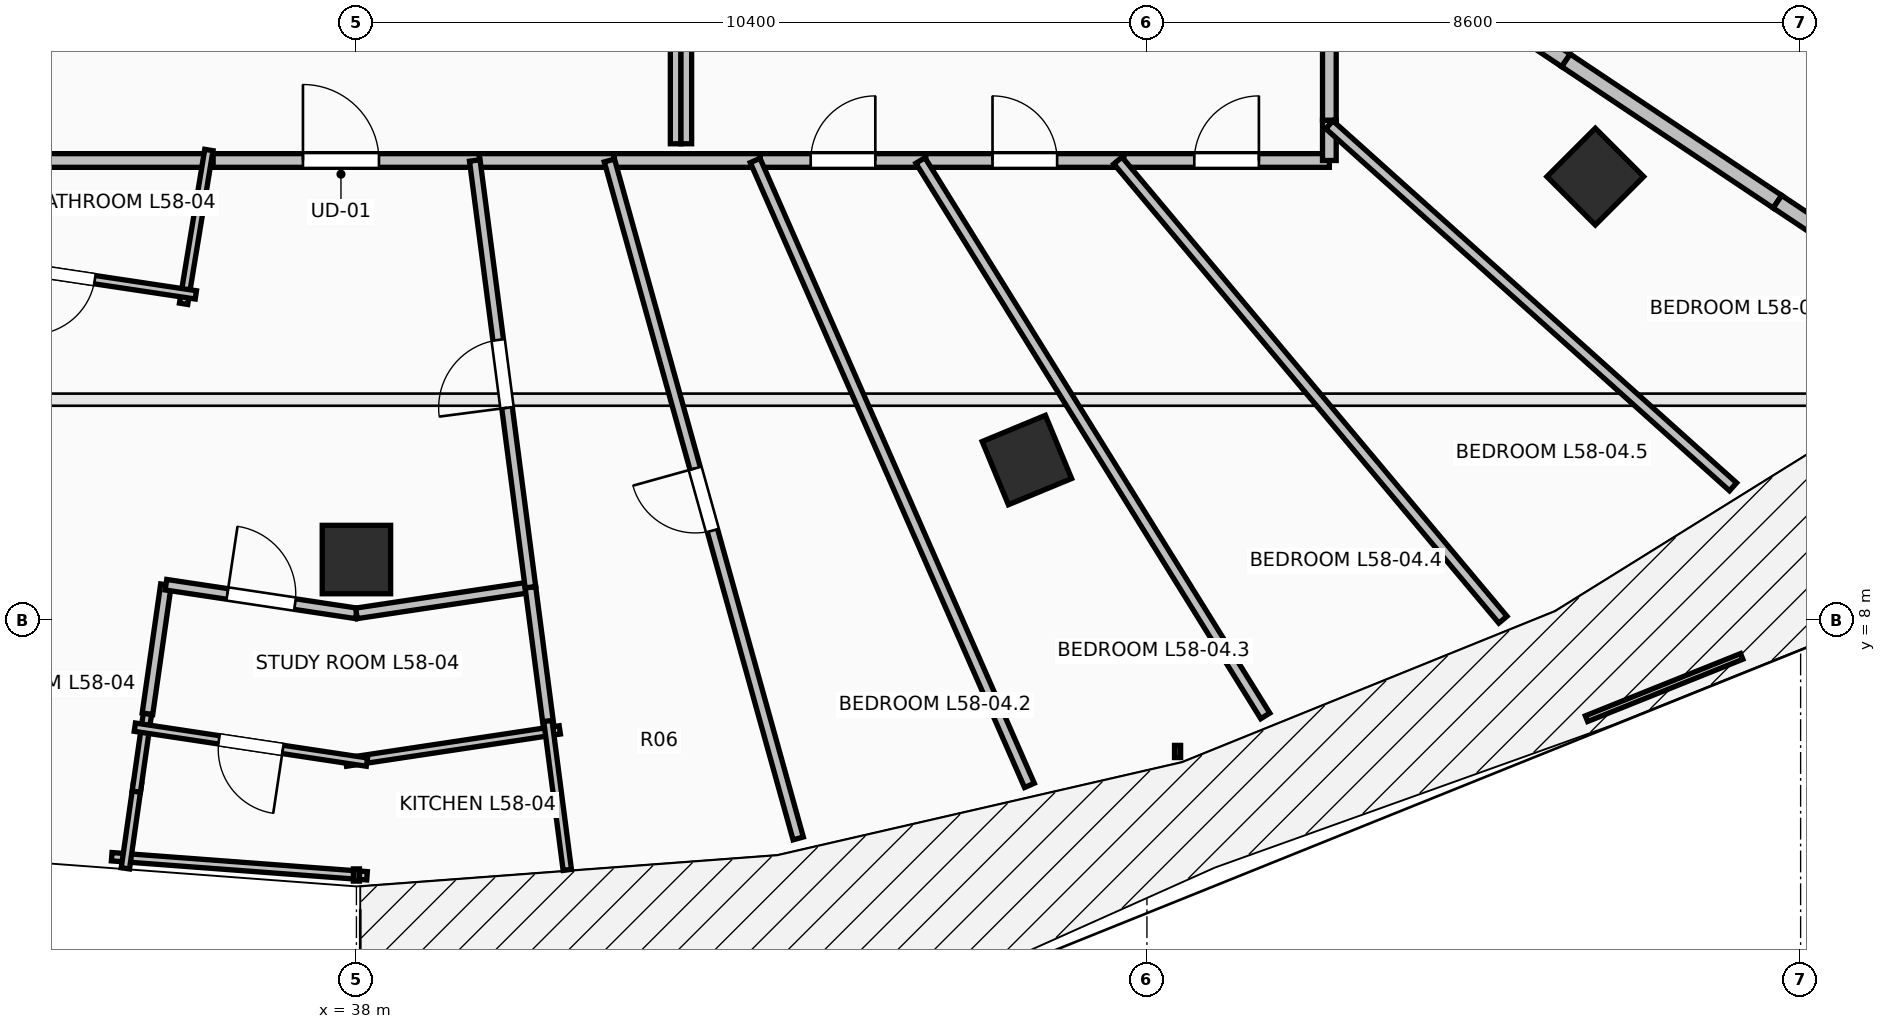
"""IFC4 building model, lengths in metres.
Left out: names, types, materials, properties, quantities, classifications, styles, units other than length and angle.
Written with IfcOpenShell. Run it as: python <this file> out.ifc"""

import sys

from ifc_helpers import new_model, si_unit, direction, frame, frame_2d, origin, origin_2d, place, context, subcontext, project, spatial, rectangle, extrude, element, fill, save


model = new_model("IFC4")
c1 = context("Model", 3, precision=1e-05, world=origin(), true_north=direction((0.0, 1.0)))
c2 = subcontext(c1, "Body", "Model", "MODEL_VIEW")
j1 = project(units=[si_unit("LENGTHUNIT", "METRE"), si_unit("PLANEANGLEUNIT", "RADIAN")], contexts=[c1])
p1 = place(None, origin())
s1 = spatial("IfcSite", under=j1, at=p1, CompositionType="ELEMENT")
p2 = place(p1, origin())
s2 = spatial("IfcBuilding", under=s1, at=p2, CompositionType="ELEMENT")
p3 = place(p2, frame((0.0, 0.0, 214.3)))
s3 = spatial("IfcBuildingStorey", under=s2, at=p3, CompositionType="ELEMENT", Elevation=214.3)
for number, where, z_axis, x_axis in (
    (1, (38.0, 8.8, 0.0), (0.0, 0.0, 1.0), (0.0, -1.0, 0.0)),
    (2, (46.821, 10.109, 0.0), (0.0, 0.0, 1.0), (0.383, -0.924, 0.0)),
    (3, (54.299, 13.838, 0.0), (0.0, 0.0, 1.0), (0.707, -0.707, 0.0)),
):
    element("IfcColumn", number, at=place(p3, frame(where, z_axis=z_axis, x_axis=x_axis)), inside=s3, PredefinedType="COLUMN", context=c2, shape_type="SweptSolid", body=[
        extrude(rectangle(XDim=0.9, YDim=0.9, at=origin_2d()), origin(), (0.0, 0.0, 1.0), 3.55),
    ])
p4 = place(p3, frame((35.975, 14.05, 0.0), z_axis=(0.0, 0.0, 1.0), x_axis=(1.0, 0.0, 0.0)))
e4 = element("IfcWall", 4, at=p4, inside=s3, PredefinedType="PARTITIONING", context=c2, shape_type="SweptSolid", body=[
    extrude(rectangle(XDim=3.643, YDim=0.18, at=frame_2d((1.821, 0.0))), origin(), (0.0, 0.0, 1.0), 2.979),
])
p5 = place(p4, frame((1.322, 0.0, 0.0)))
e5 = element("IfcOpeningElement", 5, at=p5, cuts=e4, PredefinedType="OPENING", context=c2, shape_type="SweptSolid", body=[
    extrude(rectangle(XDim=1.0, YDim=2.15, at=frame_2d((0.5, 1.075))), frame((0.0, 0.105, 0.0), z_axis=(0.0, -1.0, 0.0), x_axis=(1.0, 0.0, 0.0)), (0.0, 0.0, 1.0), 0.21),
])
p6 = place(p3, frame((32.97, 14.05, 0.0), z_axis=(0.0, 0.0, 1.0), x_axis=(1.0, 0.0, 0.0)))
e6 = element("IfcWall", 6, at=p6, inside=s3, PredefinedType="PARTITIONING", context=c2, shape_type="SweptSolid", body=[
    extrude(rectangle(XDim=3.145, YDim=0.18, at=frame_2d((1.573, 0.0))), origin(), (0.0, 0.0, 1.0), 2.979),
])
p7 = place(p3, frame((39.618, 14.05, 0.0), z_axis=(0.0, 0.0, 1.0), x_axis=(1.0, 0.0, 0.0)))
e7 = element("IfcWall", 7, at=p7, inside=s3, PredefinedType="PARTITIONING", context=c2, shape_type="SweptSolid", body=[
    extrude(rectangle(XDim=1.772, YDim=0.18, at=frame_2d((0.886, 0.0))), origin(), (0.0, 0.0, 1.0), 2.979),
])
p8 = place(p3, frame((41.39, 14.05, 0.0), z_axis=(0.0, 0.0, 1.0), x_axis=(1.0, 0.0, 0.0)))
e8 = element("IfcWall", 8, at=p8, inside=s3, PredefinedType="PARTITIONING", context=c2, shape_type="SweptSolid", body=[
    extrude(rectangle(XDim=1.922, YDim=0.18, at=frame_2d((0.961, 0.0))), origin(), (0.0, 0.0, 1.0), 2.979),
])
p9 = place(p3, frame((43.312, 14.05, 0.0), z_axis=(0.0, 0.0, 1.0), x_axis=(1.0, 0.0, 0.0)))
e9 = element("IfcWall", 9, at=p9, inside=s3, PredefinedType="PARTITIONING", context=c2, shape_type="SweptSolid", body=[
    extrude(rectangle(XDim=2.179, YDim=0.18, at=frame_2d((1.089, 0.0))), origin(), (0.0, 0.0, 1.0), 2.482),
])
p10 = place(p9, frame((0.665, 0.0, 0.0)))
e10 = element("IfcOpeningElement", 10, at=p10, cuts=e9, PredefinedType="OPENING", context=c2, shape_type="SweptSolid", body=[
    extrude(rectangle(XDim=0.85, YDim=2.1, at=frame_2d((0.425, 1.05))), frame((0.0, 0.105, 0.0), z_axis=(0.0, -1.0, 0.0), x_axis=(1.0, 0.0, 0.0)), (0.0, 0.0, 1.0), 0.21),
])
p11 = place(p3, frame((45.491, 14.05, 0.0), z_axis=(0.0, 0.0, 1.0), x_axis=(1.0, 0.0, 0.0)))
e11 = element("IfcWall", 11, at=p11, inside=s3, PredefinedType="PARTITIONING", context=c2, shape_type="SweptSolid", body=[
    extrude(rectangle(XDim=2.605, YDim=0.18, at=frame_2d((1.302, 0.0))), origin(), (0.0, 0.0, 1.0), 2.482),
])
p12 = place(p11, frame((0.877, 0.0, 0.0)))
e12 = element("IfcOpeningElement", 12, at=p12, cuts=e11, PredefinedType="OPENING", context=c2, shape_type="SweptSolid", body=[
    extrude(rectangle(XDim=0.85, YDim=2.1, at=frame_2d((0.425, 1.05))), frame((0.0, 0.105, 0.0), z_axis=(0.0, -1.0, 0.0), x_axis=(1.0, 0.0, 0.0)), (0.0, 0.0, 1.0), 0.21),
])
p13 = place(p3, frame((48.096, 14.05, 0.0), z_axis=(0.0, 0.0, 1.0), x_axis=(1.0, 0.0, 0.0)))
e13 = element("IfcWall", 13, at=p13, inside=s3, PredefinedType="PARTITIONING", context=c2, shape_type="SweptSolid", body=[
    extrude(rectangle(XDim=2.704, YDim=0.18, at=frame_2d((1.352, 0.0))), origin(), (0.0, 0.0, 1.0), 2.482),
])
p14 = place(p13, frame((0.927, 0.0, 0.0)))
e14 = element("IfcOpeningElement", 14, at=p14, cuts=e13, PredefinedType="OPENING", context=c2, shape_type="SweptSolid", body=[
    extrude(rectangle(XDim=0.85, YDim=2.1, at=frame_2d((0.425, 1.05))), frame((0.0, 0.105, 0.0), z_axis=(0.0, -1.0, 0.0), x_axis=(1.0, 0.0, 0.0)), (0.0, 0.0, 1.0), 0.21),
])
p15 = place(p3, frame((50.8, 14.05, 0.0), z_axis=(0.0, 0.0, 1.0), x_axis=(0.0, 1.0, 0.0)))
e15 = element("IfcWall", 15, at=p15, inside=s3, PredefinedType="PARTITIONING", context=c2, shape_type="SweptSolid", body=[
    extrude(rectangle(XDim=0.53, YDim=0.18, at=frame_2d((0.265, 0.0))), origin(), (0.0, 0.0, 1.0), 2.936),
])
p16 = place(p3, frame((50.8, 14.58, 0.0), z_axis=(0.0, 0.0, 1.0), x_axis=(0.0, 1.0, 0.0)))
e16 = element("IfcWall", 16, at=p16, inside=s3, PredefinedType="PARTITIONING", context=c2, shape_type="SweptSolid", body=[
    extrude(rectangle(XDim=2.927, YDim=0.18, at=frame_2d((1.463, 0.0))), origin(), (0.0, 0.0, 1.0), 2.482),
])
p17 = place(p16, frame((1.039, 0.0, 0.0)))
e17 = element("IfcOpeningElement", 17, at=p17, cuts=e16, PredefinedType="OPENING", context=c2, shape_type="SweptSolid", body=[
    extrude(rectangle(XDim=0.85, YDim=2.1, at=frame_2d((0.425, 1.05))), frame((0.0, 0.105, 0.0), z_axis=(0.0, -1.0, 0.0), x_axis=(1.0, 0.0, 0.0)), (0.0, 0.0, 1.0), 0.21),
])
p18 = place(p3, frame((36.059, 14.188, 0.0), z_axis=(0.0, 0.0, 1.0), x_axis=(-0.16206206721, -0.986780566474, 0.0)))
e18 = element("IfcWall", 18, at=p18, inside=s3, PredefinedType="PARTITIONING", context=c2, shape_type="SweptSolid", body=[
    extrude(rectangle(XDim=2.05, YDim=0.11, at=frame_2d((1.025, 0.0))), origin(), (0.0, 0.0, 1.0), 2.936),
])
p19 = place(p3, frame((35.887, 12.282, 0.0), z_axis=(0.0, 0.0, 1.0), x_axis=(-0.988902415317, 0.148566527121, 0.0)))
e19 = element("IfcWall", 19, at=p19, inside=s3, PredefinedType="PARTITIONING", context=c2, shape_type="SweptSolid", body=[
    extrude(rectangle(XDim=3.538, YDim=0.11, at=frame_2d((1.769, 0.0))), origin(), (0.0, 0.0, 1.0), 2.936),
])
p20 = place(p19, frame((1.344, 0.0, 0.0)))
e20 = element("IfcOpeningElement", 20, at=p20, cuts=e19, PredefinedType="OPENING", context=c2, shape_type="SweptSolid", body=[
    extrude(rectangle(XDim=0.85, YDim=2.1, at=frame_2d((0.425, 1.05))), frame((0.0, 0.07, 0.0), z_axis=(0.0, -1.0, 0.0), x_axis=(1.0, 0.0, 0.0)), (0.0, 0.0, 1.0), 0.14),
])
p21 = place(p3, frame((34.781, 4.89, 0.0), z_axis=(0.0, 0.0, 1.0), x_axis=(0.997225868556, -0.07443498561, 0.0)))
e21 = element("IfcWall", 21, at=p21, inside=s3, PredefinedType="PARTITIONING", context=c2, shape_type="SweptSolid", body=[
    extrude(rectangle(XDim=3.368, YDim=0.11, at=frame_2d((1.684, 0.0))), origin(), (0.0, 0.0, 1.0), 3.29),
])
p22 = place(p3, frame((34.96, 4.737, 0.0), z_axis=(0.0, 0.0, 1.0), x_axis=(0.141118797845, 0.989992669112, 0.0)))
e22 = element("IfcWall", 22, at=p22, inside=s3, PredefinedType="PARTITIONING", context=c2, shape_type="SweptSolid", body=[
    extrude(rectangle(XDim=1.13, YDim=0.11, at=frame_2d((0.565, 0.0))), origin(), (0.0, 0.0, 1.0), 3.29),
])
p23 = place(p3, frame((35.104, 5.747, 0.0), z_axis=(0.0, 0.0, 1.0), x_axis=(0.141751551652, 0.989902266693, 0.0)))
e23 = element("IfcWall", 23, at=p23, inside=s3, PredefinedType="PARTITIONING", context=c2, shape_type="SweptSolid", body=[
    extrude(rectangle(XDim=1.035, YDim=0.11, at=frame_2d((0.518, 0.0))), origin(), (0.0, 0.0, 1.0), 3.29),
])
p24 = place(p3, frame((35.251, 6.771, 0.0), z_axis=(0.0, 0.0, 1.0), x_axis=(0.141660537741, 0.98991529539, 0.0)))
e24 = element("IfcWall", 24, at=p24, inside=s3, PredefinedType="PARTITIONING", context=c2, shape_type="SweptSolid", body=[
    extrude(rectangle(XDim=1.715, YDim=0.14, at=frame_2d((0.857, 0.0))), origin(), (0.0, 0.0, 1.0), 3.29),
])
p25 = place(p3, frame((35.494, 8.469, 0.0), z_axis=(0.0, 0.0, 1.0), x_axis=(0.988876209798, -0.148740854158, 0.0)))
e25 = element("IfcWall", 25, at=p25, inside=s3, PredefinedType="PARTITIONING", context=c2, shape_type="SweptSolid", body=[
    extrude(rectangle(XDim=2.534, YDim=0.14, at=frame_2d((1.267, 0.0))), origin(), (0.0, 0.0, 1.0), 3.29),
])
p26 = place(p25, frame((0.817, 0.0, 0.0)))
e26 = element("IfcOpeningElement", 26, at=p26, cuts=e25, PredefinedType="OPENING", context=c2, shape_type="SweptSolid", body=[
    extrude(rectangle(XDim=0.9, YDim=2.1, at=frame_2d((0.45, 1.05))), frame((0.0, 0.085, 0.0), z_axis=(0.0, -1.0, 0.0), x_axis=(1.0, 0.0, 0.0)), (0.0, 0.0, 1.0), 0.17),
])
p27 = place(p3, frame((38.0, 8.092, 0.0), z_axis=(0.0, 0.0, 1.0), x_axis=(0.988896087956, 0.148608637791, 0.0)))
e27 = element("IfcWall", 27, at=p27, inside=s3, PredefinedType="PARTITIONING", context=c2, shape_type="SweptSolid", body=[
    extrude(rectangle(XDim=2.315, YDim=0.14, at=frame_2d((1.157, 0.0))), origin(), (0.0, 0.0, 1.0), 3.29),
])
p28 = place(p3, frame((40.289, 8.436, 0.0), z_axis=(0.0, 0.0, 1.0), x_axis=(0.12959001093, -0.991567662375, 0.0)))
e28 = element("IfcWall", 28, at=p28, inside=s3, PredefinedType="PARTITIONING", context=c2, shape_type="SweptSolid", body=[
    extrude(rectangle(XDim=1.914, YDim=0.14, at=frame_2d((0.957, 0.0))), origin(), (0.0, 0.0, 1.0), 3.29),
])
p29 = place(p3, frame((40.289, 8.436, 0.0), z_axis=(0.0, 0.0, 1.0), x_axis=(-0.12936683678, 0.991596803919, 0.0)))
e29 = element("IfcWall", 29, at=p29, inside=s3, PredefinedType="PARTITIONING", context=c2, shape_type="SweptSolid", body=[
    extrude(rectangle(XDim=5.662, YDim=0.14, at=frame_2d((2.831, 0.0))), origin(), (0.0, 0.0, 1.0), 2.482),
])
p30 = place(p29, frame((2.381, 0.0, 0.0)))
e30 = element("IfcOpeningElement", 30, at=p30, cuts=e29, PredefinedType="OPENING", context=c2, shape_type="SweptSolid", body=[
    extrude(rectangle(XDim=0.9, YDim=2.1, at=frame_2d((0.45, 1.05))), frame((0.0, 0.085, 0.0), z_axis=(0.0, -1.0, 0.0), x_axis=(1.0, 0.0, 0.0)), (0.0, 0.0, 1.0), 0.17),
])
p31 = place(p3, frame((40.675, 6.559, 0.0), z_axis=(0.0, 0.0, 1.0), x_axis=(-0.988857545323, -0.148864888602, 0.0)))
e31 = element("IfcWall", 31, at=p31, inside=s3, PredefinedType="PARTITIONING", context=c2, shape_type="SweptSolid", body=[
    extrude(rectangle(XDim=2.845, YDim=0.11, at=frame_2d((1.423, 0.0))), origin(), (0.0, 0.0, 1.0), 3.29),
])
p32 = place(p3, frame((38.138, 6.135, 0.0), z_axis=(0.0, 0.0, 1.0), x_axis=(-0.988868983452, 0.148788889259, 0.0)))
e32 = element("IfcWall", 32, at=p32, inside=s3, PredefinedType="PARTITIONING", context=c2, shape_type="SweptSolid", body=[
    extrude(rectangle(XDim=3.088, YDim=0.11, at=frame_2d((1.544, 0.0))), origin(), (0.0, 0.0, 1.0), 3.29),
])
p33 = place(p32, frame((1.119, 0.0, 0.0)))
e33 = element("IfcOpeningElement", 33, at=p33, cuts=e32, PredefinedType="OPENING", context=c2, shape_type="SweptSolid", body=[
    extrude(rectangle(XDim=0.85, YDim=2.1, at=frame_2d((0.425, 1.05))), frame((0.0, 0.07, 0.0), z_axis=(0.0, -1.0, 0.0), x_axis=(1.0, 0.0, 0.0)), (0.0, 0.0, 1.0), 0.14),
])
p34 = place(p3, frame((40.774, 4.717, 0.0), z_axis=(0.0, 0.0, 1.0), x_axis=(-0.129233545587, 0.991614184396, 0.0)))
e34 = element("IfcWall", 34, at=p34, inside=s3, PredefinedType="PARTITIONING", context=c2, shape_type="SweptSolid", body=[
    extrude(rectangle(XDim=1.976, YDim=0.11, at=frame_2d((0.988, 0.0))), origin(), (0.0, 0.0, 1.0), 3.29),
])
p35 = place(p3, frame((43.812, 5.131, 0.0), z_axis=(0.0, 0.0, 1.0), x_axis=(-0.268310216589, 0.963332563383, 0.0)))
e35 = element("IfcWall", 35, at=p35, inside=s3, PredefinedType="PARTITIONING", context=c2, shape_type="SweptSolid", body=[
    extrude(rectangle(XDim=9.259, YDim=0.14, at=frame_2d((4.629, 0.0))), origin(), (0.0, 0.0, 1.0), 2.482),
])
p36 = place(p35, frame((4.204, 0.0, 0.0)))
e36 = element("IfcOpeningElement", 36, at=p36, cuts=e35, PredefinedType="OPENING", context=c2, shape_type="SweptSolid", body=[
    extrude(rectangle(XDim=0.85, YDim=2.1, at=frame_2d((0.425, 1.05))), frame((0.0, 0.085, 0.0), z_axis=(0.0, -1.0, 0.0), x_axis=(1.0, 0.0, 0.0)), (0.0, 0.0, 1.0), 0.17),
])
p37 = place(p3, frame((46.854, 5.829, 0.0), z_axis=(0.0, 0.0, 1.0), x_axis=(-0.401869944724, 0.915696755224, 0.0)))
e37 = element("IfcWall", 37, at=p37, inside=s3, PredefinedType="PARTITIONING", context=c2, shape_type="SweptSolid", body=[
    extrude(rectangle(XDim=8.978, YDim=0.14, at=frame_2d((4.489, 0.0))), origin(), (0.0, 0.0, 1.0), 2.482),
])
p38 = place(p3, frame((49.957, 6.743, 0.0), z_axis=(0.0, 0.0, 1.0), x_axis=(-0.527501342892, 0.849554196769, 0.0)))
e38 = element("IfcWall", 38, at=p38, inside=s3, PredefinedType="PARTITIONING", context=c2, shape_type="SweptSolid", body=[
    extrude(rectangle(XDim=8.601, YDim=0.14, at=frame_2d((4.301, 0.0))), origin(), (0.0, 0.0, 1.0), 2.482),
])
p39 = place(p3, frame((53.083, 8.009, 0.0), z_axis=(0.0, 0.0, 1.0), x_axis=(-0.642484403916, 0.766298760749, 0.0)))
e39 = element("IfcWall", 39, at=p39, inside=s3, PredefinedType="PARTITIONING", context=c2, shape_type="SweptSolid", body=[
    extrude(rectangle(XDim=7.883, YDim=0.14, at=frame_2d((3.942, 0.0))), origin(), (0.0, 0.0, 1.0), 2.482),
])
p40 = place(p3, frame((56.111, 9.757, 0.0), z_axis=(0.0, 0.0, 1.0), x_axis=(-0.744477346253, 0.667647722168, 0.0)))
e40 = element("IfcWall", 40, at=p40, inside=s3, PredefinedType="PARTITIONING", context=c2, shape_type="SweptSolid", body=[
    extrude(rectangle(XDim=7.134, YDim=0.14, at=frame_2d((3.567, 0.0))), origin(), (0.0, 0.0, 1.0), 2.824),
])
p41 = place(p3, frame((56.695, 13.508, 0.0), z_axis=(0.0, 0.0, 1.0), x_axis=(-0.831533913479, 0.55547398745, 0.0)))
e41 = element("IfcWall", 41, at=p41, inside=s3, PredefinedType="PARTITIONING", context=c2, shape_type="SweptSolid", body=[
    extrude(rectangle(XDim=3.348, YDim=0.2, at=frame_2d((1.674, 0.0))), origin(), (0.0, 0.0, 1.0), 2.824),
])
p42 = place(p3, frame((53.911, 15.368, 0.0), z_axis=(0.0, 0.0, 1.0), x_axis=(-0.83140728108, 0.55566350696, 0.0)))
e42 = element("IfcWall", 42, at=p42, inside=s3, PredefinedType="PARTITIONING", context=c2, shape_type="SweptSolid", body=[
    extrude(rectangle(XDim=3.742, YDim=0.2, at=frame_2d((1.871, 0.0))), origin(), (0.0, 0.0, 1.0), 2.936),
])
p43 = place(p3, frame((59.067, 11.924, 0.0), z_axis=(0.0, 0.0, 1.0), x_axis=(-0.831602270354, 0.555371644885, 0.0)))
e43 = element("IfcWall", 43, at=p43, inside=s3, PredefinedType="PARTITIONING", context=c2, shape_type="SweptSolid", body=[
    extrude(rectangle(XDim=2.852, YDim=0.2, at=frame_2d((1.426, 0.0))), origin(), (0.0, 0.0, 1.0), 3.29),
])
for number, where, z_axis, x_axis in (
    (44, (42.2, 16.1, 0.0), (0.0, 0.0, 1.0), (0.0, -1.0, 0.0)),
    (45, (42.34, 14.27, 0.0), (0.0, 0.0, 1.0), (0.0, 1.0, 0.0)),
):
    element("IfcWall", number, at=place(p3, frame(where, z_axis=z_axis, x_axis=x_axis)), inside=s3, PredefinedType="PARTITIONING", context=c2, shape_type="SweptSolid", body=[
        extrude(rectangle(XDim=1.83, YDim=0.14, at=frame_2d((0.915, 0.0))), origin(), (0.0, 0.0, 1.0), 2.979),
    ])
p44 = place(p5, origin())
e46 = element("IfcDoor", 46, at=p44, inside=s3, OperationType="SINGLE_SWING_LEFT", PredefinedType="DOOR", context=c2, shape_type="SweptSolid", body=[
    extrude(rectangle(XDim=1.0, YDim=2.15, at=frame_2d((0.5, 1.075))), frame((0.0, 0.025, 0.0), z_axis=(0.0, -1.0, 0.0), x_axis=(1.0, 0.0, 0.0)), (0.0, 0.0, 1.0), 0.05),
])
fill(e5, e46)
p45 = place(p20, origin())
e47 = element("IfcDoor", 47, at=p45, inside=s3, OperationType="SINGLE_SWING_RIGHT", PredefinedType="DOOR", context=c2, shape_type="SweptSolid", body=[
    extrude(rectangle(XDim=0.85, YDim=2.1, at=frame_2d((0.425, 1.05))), frame((0.0, 0.025, 0.0), z_axis=(0.0, -1.0, 0.0), x_axis=(1.0, 0.0, 0.0)), (0.0, 0.0, 1.0), 0.05),
])
fill(e20, e47)
p46 = place(p26, origin())
e48 = element("IfcDoor", 48, at=p46, inside=s3, OperationType="SINGLE_SWING_LEFT", PredefinedType="DOOR", context=c2, shape_type="SweptSolid", body=[
    extrude(rectangle(XDim=0.9, YDim=2.1, at=frame_2d((0.45, 1.05))), frame((0.0, 0.025, 0.0), z_axis=(0.0, -1.0, 0.0), x_axis=(1.0, 0.0, 0.0)), (0.0, 0.0, 1.0), 0.05),
])
fill(e26, e48)
p47 = place(p30, origin())
e49 = element("IfcDoor", 49, at=p47, inside=s3, OperationType="SINGLE_SWING_LEFT", PredefinedType="DOOR", context=c2, shape_type="SweptSolid", body=[
    extrude(rectangle(XDim=0.9, YDim=2.1, at=frame_2d((0.45, 1.05))), frame((0.0, 0.025, 0.0), z_axis=(0.0, -1.0, 0.0), x_axis=(1.0, 0.0, 0.0)), (0.0, 0.0, 1.0), 0.05),
])
fill(e30, e49)
p48 = place(p10, origin())
e50 = element("IfcDoor", 50, at=p48, inside=s3, OperationType="SINGLE_SWING_RIGHT", PredefinedType="DOOR", context=c2, shape_type="SweptSolid", body=[
    extrude(rectangle(XDim=0.85, YDim=2.1, at=frame_2d((0.425, 1.05))), frame((0.0, 0.025, 0.0), z_axis=(0.0, -1.0, 0.0), x_axis=(1.0, 0.0, 0.0)), (0.0, 0.0, 1.0), 0.05),
])
fill(e10, e50)
p49 = place(p12, origin())
e51 = element("IfcDoor", 51, at=p49, inside=s3, OperationType="SINGLE_SWING_LEFT", PredefinedType="DOOR", context=c2, shape_type="SweptSolid", body=[
    extrude(rectangle(XDim=0.85, YDim=2.1, at=frame_2d((0.425, 1.05))), frame((0.0, 0.025, 0.0), z_axis=(0.0, -1.0, 0.0), x_axis=(1.0, 0.0, 0.0)), (0.0, 0.0, 1.0), 0.05),
])
fill(e12, e51)
p50 = place(p14, origin())
e52 = element("IfcDoor", 52, at=p50, inside=s3, OperationType="SINGLE_SWING_RIGHT", PredefinedType="DOOR", context=c2, shape_type="SweptSolid", body=[
    extrude(rectangle(XDim=0.85, YDim=2.1, at=frame_2d((0.425, 1.05))), frame((0.0, 0.025, 0.0), z_axis=(0.0, -1.0, 0.0), x_axis=(1.0, 0.0, 0.0)), (0.0, 0.0, 1.0), 0.05),
])
fill(e14, e52)
p51 = place(p33, origin())
e53 = element("IfcDoor", 53, at=p51, inside=s3, OperationType="SINGLE_SWING_LEFT", PredefinedType="DOOR", context=c2, shape_type="SweptSolid", body=[
    extrude(rectangle(XDim=0.85, YDim=2.1, at=frame_2d((0.425, 1.05))), frame((0.0, 0.025, 0.0), z_axis=(0.0, -1.0, 0.0), x_axis=(1.0, 0.0, 0.0)), (0.0, 0.0, 1.0), 0.05),
])
fill(e33, e53)
p52 = place(p36, origin())
e54 = element("IfcDoor", 54, at=p52, inside=s3, OperationType="SINGLE_SWING_RIGHT", PredefinedType="DOOR", context=c2, shape_type="SweptSolid", body=[
    extrude(rectangle(XDim=0.85, YDim=2.1, at=frame_2d((0.425, 1.05))), frame((0.0, 0.025, 0.0), z_axis=(0.0, -1.0, 0.0), x_axis=(1.0, 0.0, 0.0)), (0.0, 0.0, 1.0), 0.05),
])
fill(e36, e54)
save(model, sys.argv[1])
